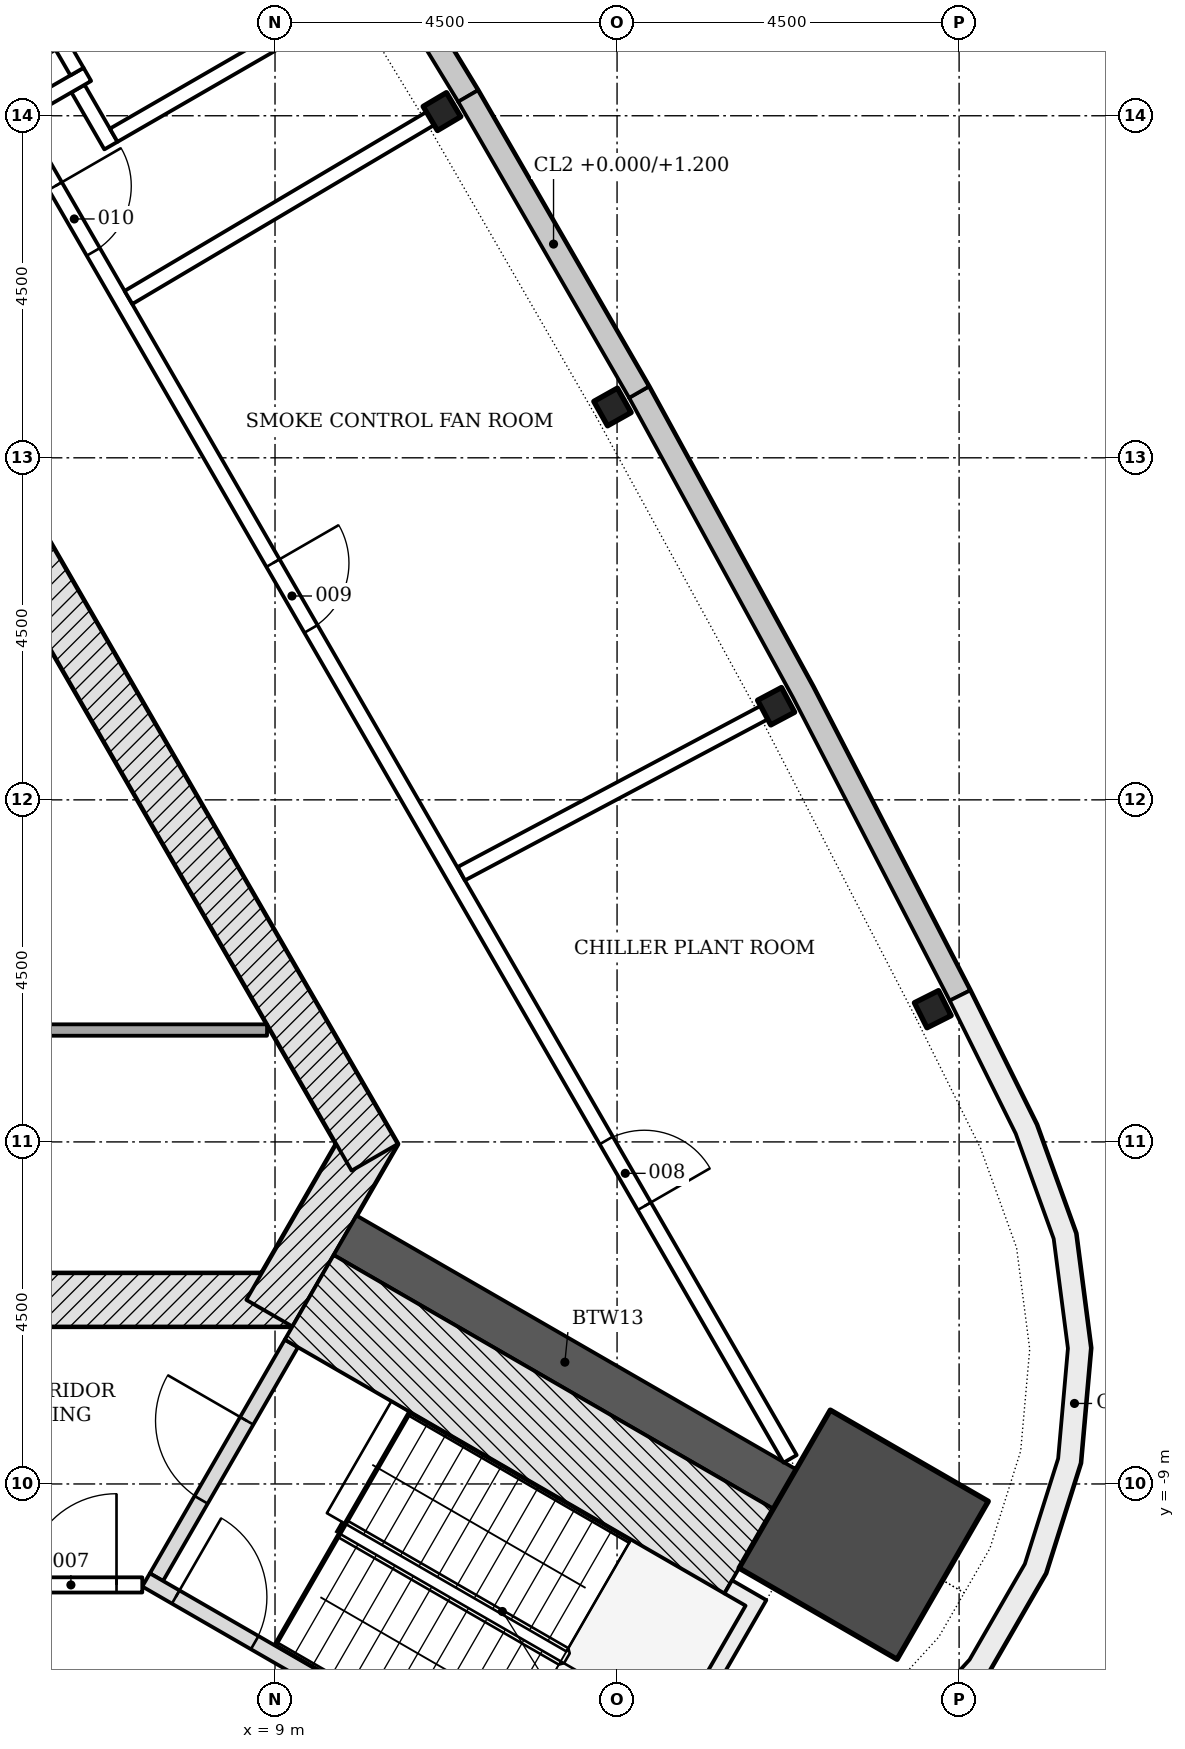
"""IFC4 building model, lengths in metres.
Left out: names, types, materials, properties, quantities, classifications, styles, units other than length and angle.
Written with IfcOpenShell. Run it as: python <this file> out.ifc"""

import sys

from ifc_helpers import new_model, si_unit, direction, frame, frame_2d, origin, origin_2d, place, context, subcontext, project, spatial, polyline, rectangle, i_section, outline, extrude, element, fill, save


model = new_model("IFC4")
c1 = context("Model", 3, precision=1e-05, world=origin(), true_north=direction((0.0, 1.0)))
c2 = subcontext(c1, "Body", "Model", "MODEL_VIEW")
j1 = project(units=[si_unit("LENGTHUNIT", "METRE"), si_unit("PLANEANGLEUNIT", "RADIAN")], contexts=[c1])
p1 = place(None, origin())
s1 = spatial("IfcSite", under=j1, at=p1, CompositionType="ELEMENT")
p2 = place(p1, origin())
s2 = spatial("IfcBuilding", under=s1, at=p2, CompositionType="ELEMENT")
p3 = place(p2, frame((0.0, 0.0, 293.1)))
s3 = spatial("IfcBuildingStorey", under=s2, at=p3, CompositionType="ELEMENT", Elevation=293.1)
p4 = place(p3, frame((-9.229, -6.578, -0.25), z_axis=(0.0, 0.0, 1.0), x_axis=(1.0, 0.0, 0.0)))
e1 = element("IfcWall", 1, at=p4, inside=s3, PredefinedType="SHEAR", context=c2, shape_type="SweptSolid", body=[
    extrude(rectangle(XDim=18.458, YDim=0.7, at=frame_2d((9.229, 0.0))), origin(), (0.0, 0.0, 1.0), 4.5),
])
p5 = place(p4, frame((8.7, 0.0, 0.25)))
e2 = element("IfcOpeningElement", 2, at=p5, cuts=e1, PredefinedType="OPENING", context=c2, shape_type="SweptSolid", body=[
    extrude(rectangle(XDim=1.0, YDim=2.1, at=frame_2d((0.5, 1.05))), frame((0.0, 0.36, 0.0), z_axis=(0.0, -1.0, 0.0), x_axis=(1.0, 0.0, 0.0)), (0.0, 0.0, 1.0), 0.72),
])
p6 = place(p4, frame((3.99, 0.0, 0.25)))
e3 = element("IfcOpeningElement", 3, at=p6, cuts=e1, PredefinedType="OPENING", context=c2, shape_type="SweptSolid", body=[
    extrude(rectangle(XDim=0.9, YDim=2.1, at=frame_2d((0.45, 1.05))), frame((0.0, 0.36, 0.0), z_axis=(0.0, -1.0, 0.0), x_axis=(1.0, 0.0, 0.0)), (0.0, 0.0, 1.0), 0.72),
])
p7 = place(p4, frame((13.539, 0.0, 0.25)))
e4 = element("IfcOpeningElement", 4, at=p7, cuts=e1, PredefinedType="OPENING", context=c2, shape_type="SweptSolid", body=[
    extrude(rectangle(XDim=0.9, YDim=2.1, at=frame_2d((0.45, 1.05))), frame((0.0, 0.36, 0.0), z_axis=(0.0, -1.0, 0.0), x_axis=(1.0, 0.0, 0.0)), (0.0, 0.0, 1.0), 0.72),
])
p8 = place(p3, frame((8.926, -6.753, -0.25), z_axis=(0.0, 0.0, 1.0), x_axis=(0.500042739161, 0.866000726912, 0.0)))
e5 = element("IfcWall", 5, at=p8, inside=s3, PredefinedType="SHEAR", context=c2, shape_type="SweptSolid", body=[
    extrude(rectangle(XDim=2.771, YDim=0.7, at=frame_2d((1.386, 0.0))), origin(), (0.0, 0.0, 1.0), 4.5),
])
p9 = place(p3, frame((10.311, -4.703, -0.25), z_axis=(0.0, 0.0, 1.0), x_axis=(-0.500001446645, 0.866024568562, 0.0)))
e6 = element("IfcWall", 6, at=p9, inside=s3, PredefinedType="SHEAR", context=c2, shape_type="SweptSolid", body=[
    extrude(rectangle(XDim=18.458, YDim=0.7, at=frame_2d((9.229, 0.0))), origin(), (0.0, 0.0, 1.0), 4.5),
])
p10 = place(p3, frame((9.922, -5.728, -0.25), z_axis=(0.0, 0.0, 1.0), x_axis=(0.866032176823, -0.499988268569, 0.0)))
e7 = element("IfcWall", 7, at=p10, inside=s3, PredefinedType="SHEAR", context=c2, shape_type="SweptSolid", body=[
    extrude(rectangle(XDim=6.678, YDim=0.6, at=frame_2d((3.339, 0.0))), origin(), (0.0, 0.0, 1.0), 4.5),
])
p11 = place(p3, frame((16.745, -9.667, -0.25), z_axis=(0.0, 0.0, 1.0), x_axis=(0.866025403784, -0.5, 0.0)))
e8 = element("IfcColumn", 8, at=p11, inside=s3, PredefinedType="COLUMN", context=c2, shape_type="SweptSolid", body=[
    extrude(rectangle(XDim=2.4, YDim=2.4, at=origin_2d()), origin(), (0.0, 0.0, 1.0), 4.5),
])
for number, where, z_axis, x_axis in (
    (9, (17.654, -2.754, -0.25), (0.0, 0.0, 1.0), (-0.449, 0.894, 0.0)),
    (10, (15.593, 1.232, -0.25), (0.0, 0.0, 1.0), (-0.47, 0.883, 0.0)),
    (11, (13.44, 5.169, -0.25), (0.0, 0.0, 1.0), (-0.49, 0.872, 0.0)),
    (12, (11.196, 9.055, -0.25), (0.0, 0.0, 1.0), (-0.51, 0.86, 0.0)),
):
    element("IfcColumn", number, at=place(p3, frame(where, z_axis=z_axis, x_axis=x_axis)), inside=s3, PredefinedType="COLUMN", context=c2, shape_type="SweptSolid", body=[
        extrude(i_section(OverallWidth=0.368, OverallDepth=0.356, WebThickness=0.011, FlangeThickness=0.018, FilletRadius=0.015, at=origin_2d()), origin(), (0.0, 0.0, 1.0), 4.5),
    ])
p12 = place(p3, origin())
e13 = element("IfcWall", 13, at=p12, inside=s3, PredefinedType="NOTDEFINED", context=c2, shape_type="SweptSolid", body=[
    extrude(outline(polyline([(18.145, -2.507), (16.078, 1.49), (13.919, 5.438), (13.656, 5.294), (15.813, 1.349), (17.878, -2.645), (18.145, -2.507)])), origin(), (0.0, 0.0, 1.0), 4.25),
])
p13 = place(p3, origin())
e14 = element("IfcWall", 14, at=p13, inside=s3, PredefinedType="NOTDEFINED", context=c2, shape_type="SweptSolid", body=[
    extrude(outline(polyline([(11.669, 9.335), (9.33, 13.179), (6.901, 16.968), (6.649, 16.806), (9.075, 13.02), (11.413, 9.179), (11.669, 9.335)])), origin(), (0.0, 0.0, 1.0), 4.25),
])
p14 = place(p3, origin())
e15 = element("IfcWall", 15, at=p14, inside=s3, PredefinedType="NOTDEFINED", context=c2, shape_type="SweptSolid", body=[
    extrude(outline(polyline([(13.919, 5.438), (11.669, 9.335), (11.409, 9.185), (13.659, 5.288), (13.919, 5.438)])), origin(), (0.0, 0.0, 1.0), 1.2),
])
p15 = place(p3, origin())
e16 = element("IfcWall", 16, at=p15, inside=s3, PredefinedType="NOTDEFINED", context=c2, shape_type="SweptSolid", body=[
    extrude(outline(polyline([(11.244, -14.46), (13.211, -14.336), (14.708, -14.069), (16.111, -13.485), (17.355, -12.611), (18.381, -11.49), (19.141, -10.174), (19.599, -8.724), (19.733, -7.21), (19.538, -5.703), (19.021, -4.273), (18.145, -2.507), (17.876, -2.64), (18.745, -4.391), (19.244, -5.774), (19.432, -7.216), (19.303, -8.665), (18.865, -10.052), (18.138, -11.312), (17.156, -12.385), (15.965, -13.22), (14.623, -13.779), (13.176, -14.038), (11.225, -14.161), (11.244, -14.46)])), origin(), (0.0, 0.0, 1.0), 4.25),
])
p16 = place(p3, frame((1.071, -3.028, 0.0), z_axis=(0.0, 0.0, 1.0), x_axis=(1.0, 0.0, 0.0)))
e17 = element("IfcWall", 17, at=p16, inside=s3, PredefinedType="PARTITIONING", context=c2, shape_type="SweptSolid", body=[
    extrude(rectangle(XDim=7.824, YDim=0.15, at=frame_2d((3.912, 0.0))), origin(), (0.0, 0.0, 1.0), 4.25),
])
p17 = place(p3, frame((7.44, -10.226, -0.25), z_axis=(0.0, 0.0, 1.0), x_axis=(0.500022077904, 0.866012656725, 0.0)))
e18 = element("IfcWall", 18, at=p17, inside=s3, PredefinedType="SHEAR", context=c2, shape_type="SweptSolid", body=[
    extrude(rectangle(XDim=3.55, YDim=0.2, at=frame_2d((1.775, 0.0))), origin(), (0.0, 0.0, 1.0), 4.5),
])
p18 = place(p17, frame((1.175, 0.0, 0.25)))
e19 = element("IfcOpeningElement", 19, at=p18, cuts=e18, PredefinedType="OPENING", context=c2, shape_type="SweptSolid", body=[
    extrude(rectangle(XDim=1.2, YDim=2.1, at=frame_2d((0.6, 1.05))), frame((0.0, 0.11, 0.0), z_axis=(0.0, -1.0, 0.0), x_axis=(1.0, 0.0, 0.0)), (0.0, 0.0, 1.0), 0.22),
])
p19 = place(p3, frame((7.304, -10.262, -0.25), z_axis=(0.0, 0.0, 1.0), x_axis=(0.866026594901, -0.49999793692, 0.0)))
e20 = element("IfcWall", 20, at=p19, inside=s3, PredefinedType="SHEAR", context=c2, shape_type="SweptSolid", body=[
    extrude(rectangle(XDim=5.6, YDim=0.2, at=frame_2d((2.8, 0.0))), origin(), (0.0, 0.0, 1.0), 4.5),
])
p20 = place(p19, frame((0.45, 0.0, 0.25)))
e21 = element("IfcOpeningElement", 21, at=p20, cuts=e20, PredefinedType="OPENING", context=c2, shape_type="SweptSolid", body=[
    extrude(rectangle(XDim=1.2, YDim=2.1, at=frame_2d((0.6, 1.05))), frame((0.0, 0.11, 0.0), z_axis=(0.0, -1.0, 0.0), x_axis=(1.0, 0.0, 0.0)), (0.0, 0.0, 1.0), 0.22),
])
p21 = place(p3, frame((9.45, -6.545, -0.25), z_axis=(0.0, 0.0, 1.0), x_axis=(0.866016347338, -0.500015685897, 0.0)))
e22 = element("IfcWall", 22, at=p21, inside=s3, PredefinedType="SHEAR", context=c2, shape_type="SweptSolid", body=[
    extrude(rectangle(XDim=6.678, YDim=1.286, at=frame_2d((3.339, 0.0))), origin(), (0.0, 0.0, 1.0), 4.5),
])
p22 = place(p3, frame((0.0, 0.0, -0.25)))
e23 = element("IfcWall", 23, at=p22, inside=s3, PredefinedType="SHEAR", context=c2, shape_type="SweptSolid", body=[
    extrude(outline(polyline([(12.104, -13.149), (14.289, -12.563), (15.464, -10.528), (15.013, -10.268), (14.913, -10.441), (15.191, -10.601), (14.157, -12.392), (12.132, -12.934), (12.204, -12.976), (12.204, -12.976), (12.204, -12.976), (12.204, -12.976), (12.204, -12.976), (12.204, -12.976), (12.204, -12.976), (12.204, -12.976), (12.204, -12.976), (12.204, -12.976), (12.204, -12.976), (12.204, -12.976), (12.204, -12.976), (12.204, -12.976), (12.204, -12.976), (12.204, -12.976), (12.204, -12.976), (12.104, -13.149)])), origin(), (0.0, 0.0, 1.0), 4.5),
])
p23 = place(p3, frame((5.1, -10.328, 0.0), z_axis=(0.0, 0.0, 1.0), x_axis=(1.0, 0.0, 0.0)))
e24 = element("IfcWall", 24, at=p23, inside=s3, PredefinedType="PARTITIONING", context=c2, shape_type="SweptSolid", body=[
    extrude(rectangle(XDim=2.154, YDim=0.2, at=frame_2d((1.077, 0.0))), origin(), (0.0, 0.0, 1.0), 3.702),
])
p24 = place(p23, frame((0.615, 0.0, 0.0)))
e25 = element("IfcOpeningElement", 25, at=p24, cuts=e24, PredefinedType="OPENING", context=c2, shape_type="SweptSolid", body=[
    extrude(rectangle(XDim=1.2, YDim=2.1, at=frame_2d((0.6, 1.05))), frame((0.0, 0.11, 0.0), z_axis=(0.0, -1.0, 0.0), x_axis=(1.0, 0.0, 0.0)), (0.0, 0.0, 1.0), 0.22),
])
p25 = place(p3, frame((6.408, 9.358, 0.0), z_axis=(0.0, 0.0, 1.0), x_axis=(0.499958279983, -0.866049489508, 0.0)))
e26 = element("IfcWall", 26, at=p25, inside=s3, PredefinedType="PARTITIONING", context=c2, shape_type="SweptSolid", body=[
    extrude(rectangle(XDim=0.866, YDim=0.2, at=frame_2d((0.433, 0.0))), origin(), (0.0, 0.0, 1.0), 4.25),
])
p26 = place(p3, frame((5.494, 8.945, 0.0), z_axis=(0.0, 0.0, 1.0), x_axis=(0.866039638822, 0.499975343382, 0.0)))
e27 = element("IfcWall", 27, at=p26, inside=s3, PredefinedType="PARTITIONING", context=c2, shape_type="SweptSolid", body=[
    extrude(rectangle(XDim=1.198, YDim=0.2, at=frame_2d((0.599, 0.0))), origin(), (0.0, 0.0, 1.0), 4.25),
])
p27 = place(p3, frame((6.395, 9.581, 0.0), z_axis=(0.0, 0.0, 1.0), x_axis=(-0.500003735859, 0.866023246874, 0.0)))
e28 = element("IfcWall", 28, at=p27, inside=s3, PredefinedType="PARTITIONING", context=c2, shape_type="SweptSolid", body=[
    extrude(rectangle(XDim=2.154, YDim=0.2, at=frame_2d((1.077, 0.0))), origin(), (0.0, 0.0, 1.0), 3.702),
])
p28 = place(p27, frame((0.383, 0.0, 0.0)))
e29 = element("IfcOpeningElement", 29, at=p28, cuts=e28, PredefinedType="OPENING", context=c2, shape_type="SweptSolid", body=[
    extrude(rectangle(XDim=1.2, YDim=2.1, at=frame_2d((0.6, 1.05))), frame((0.0, 0.11, 0.0), z_axis=(0.0, -1.0, 0.0), x_axis=(1.0, 0.0, 0.0)), (0.0, 0.0, 1.0), 0.22),
])
p29 = place(p3, frame((5.628, 8.908, 0.0), z_axis=(0.0, 0.0, 1.0), x_axis=(0.500003229304, -0.866023539337, 0.0)))
e30 = element("IfcWall", 30, at=p29, inside=s3, PredefinedType="PARTITIONING", context=c2, shape_type="SweptSolid", body=[
    extrude(rectangle(XDim=20.297, YDim=0.2, at=frame_2d((10.148, 0.0))), origin(), (0.0, 0.0, 1.0), 3.702),
])
p30 = place(p29, frame((15.459, 0.0, 0.0)))
e31 = element("IfcOpeningElement", 31, at=p30, cuts=e30, PredefinedType="OPENING", context=c2, shape_type="SweptSolid", body=[
    extrude(rectangle(XDim=1.0, YDim=2.1, at=frame_2d((0.5, 1.05))), frame((0.0, 0.11, 0.0), z_axis=(0.0, -1.0, 0.0), x_axis=(1.0, 0.0, 0.0)), (0.0, 0.0, 1.0), 0.22),
])
p31 = place(p29, frame((6.689, 0.0, 0.0)))
e32 = element("IfcOpeningElement", 32, at=p31, cuts=e30, PredefinedType="OPENING", context=c2, shape_type="SweptSolid", body=[
    extrude(rectangle(XDim=1.0, YDim=2.1, at=frame_2d((0.5, 1.05))), frame((0.0, 0.11, 0.0), z_axis=(0.0, -1.0, 0.0), x_axis=(1.0, 0.0, 0.0)), (0.0, 0.0, 1.0), 0.22),
])
p32 = place(p29, frame((0.961, 0.0, 0.0)))
e33 = element("IfcOpeningElement", 33, at=p32, cuts=e30, PredefinedType="OPENING", context=c2, shape_type="SweptSolid", body=[
    extrude(rectangle(XDim=1.0, YDim=2.1, at=frame_2d((0.5, 1.05))), frame((0.0, 0.11, 0.0), z_axis=(0.0, -1.0, 0.0), x_axis=(1.0, 0.0, 0.0)), (0.0, 0.0, 1.0), 0.22),
])
p33 = place(p3, frame((11.451, -0.971, 0.0), z_axis=(0.0, 0.0, 1.0), x_axis=(0.882895630062, 0.469569277548, 0.0)))
e34 = element("IfcWall", 34, at=p33, inside=s3, PredefinedType="PARTITIONING", context=c2, shape_type="SweptSolid", body=[
    extrude(rectangle(XDim=4.541, YDim=0.2, at=frame_2d((2.27, 0.0))), origin(), (0.0, 0.0, 1.0), 3.702),
])
p34 = place(p3, frame((7.072, 6.61, 0.0), z_axis=(0.0, 0.0, 1.0), x_axis=(0.860180512155, 0.509989692552, 0.0)))
e35 = element("IfcWall", 35, at=p34, inside=s3, PredefinedType="PARTITIONING", context=c2, shape_type="SweptSolid", body=[
    extrude(rectangle(XDim=4.645, YDim=0.2, at=frame_2d((2.322, 0.0))), origin(), (0.0, 0.0, 1.0), 3.702),
])
p35 = place(p3, frame((6.878, 8.744, 0.0), z_axis=(0.0, 0.0, 1.0), x_axis=(0.866025387892, 0.500000027526, 0.0)))
e36 = element("IfcWall", 36, at=p35, inside=s3, PredefinedType="PARTITIONING", context=c2, shape_type="SweptSolid", body=[
    extrude(rectangle(XDim=3.122, YDim=0.2, at=frame_2d((1.561, 0.0))), origin(), (0.0, 0.0, 1.0), 4.25),
])
p36 = place(p18, origin())
e37 = element("IfcDoor", 37, at=p36, inside=s3, OperationType="SINGLE_SWING_RIGHT", PredefinedType="DOOR", context=c2, shape_type="SweptSolid", body=[
    extrude(rectangle(XDim=1.2, YDim=2.1, at=frame_2d((0.6, 1.05))), frame((0.0, 0.025, 0.0), z_axis=(0.0, -1.0, 0.0), x_axis=(1.0, 0.0, 0.0)), (0.0, 0.0, 1.0), 0.05),
])
fill(e19, e37)
p37 = place(p20, origin())
e38 = element("IfcDoor", 38, at=p37, inside=s3, OperationType="SINGLE_SWING_LEFT", PredefinedType="DOOR", context=c2, shape_type="SweptSolid", body=[
    extrude(rectangle(XDim=1.2, YDim=2.1, at=frame_2d((0.6, 1.05))), frame((0.0, 0.025, 0.0), z_axis=(0.0, -1.0, 0.0), x_axis=(1.0, 0.0, 0.0)), (0.0, 0.0, 1.0), 0.05),
])
fill(e21, e38)
p38 = place(p24, origin())
e39 = element("IfcDoor", 39, at=p38, inside=s3, OperationType="SINGLE_SWING_RIGHT", PredefinedType="DOOR", context=c2, shape_type="SweptSolid", body=[
    extrude(rectangle(XDim=1.2, YDim=2.1, at=frame_2d((0.6, 1.05))), frame((0.0, 0.025, 0.0), z_axis=(0.0, -1.0, 0.0), x_axis=(1.0, 0.0, 0.0)), (0.0, 0.0, 1.0), 0.05),
])
fill(e25, e39)
p39 = place(p30, origin())
e40 = element("IfcDoor", 40, at=p39, inside=s3, OperationType="SINGLE_SWING_RIGHT", PredefinedType="DOOR", context=c2, shape_type="SweptSolid", body=[
    extrude(rectangle(XDim=1.0, YDim=2.1, at=frame_2d((0.5, 1.05))), frame((0.0, 0.025, 0.0), z_axis=(0.0, -1.0, 0.0), x_axis=(1.0, 0.0, 0.0)), (0.0, 0.0, 1.0), 0.05),
])
fill(e31, e40)
p40 = place(p31, origin())
e41 = element("IfcDoor", 41, at=p40, inside=s3, OperationType="SINGLE_SWING_LEFT", PredefinedType="DOOR", context=c2, shape_type="SweptSolid", body=[
    extrude(rectangle(XDim=1.0, YDim=2.1, at=frame_2d((0.5, 1.05))), frame((0.0, 0.025, 0.0), z_axis=(0.0, -1.0, 0.0), x_axis=(1.0, 0.0, 0.0)), (0.0, 0.0, 1.0), 0.05),
])
fill(e32, e41)
p41 = place(p32, origin())
e42 = element("IfcDoor", 42, at=p41, inside=s3, OperationType="SINGLE_SWING_LEFT", PredefinedType="DOOR", context=c2, shape_type="SweptSolid", body=[
    extrude(rectangle(XDim=1.0, YDim=2.1, at=frame_2d((0.5, 1.05))), frame((0.0, 0.025, 0.0), z_axis=(0.0, -1.0, 0.0), x_axis=(1.0, 0.0, 0.0)), (0.0, 0.0, 1.0), 0.05),
])
fill(e33, e42)
save(model, sys.argv[1])
